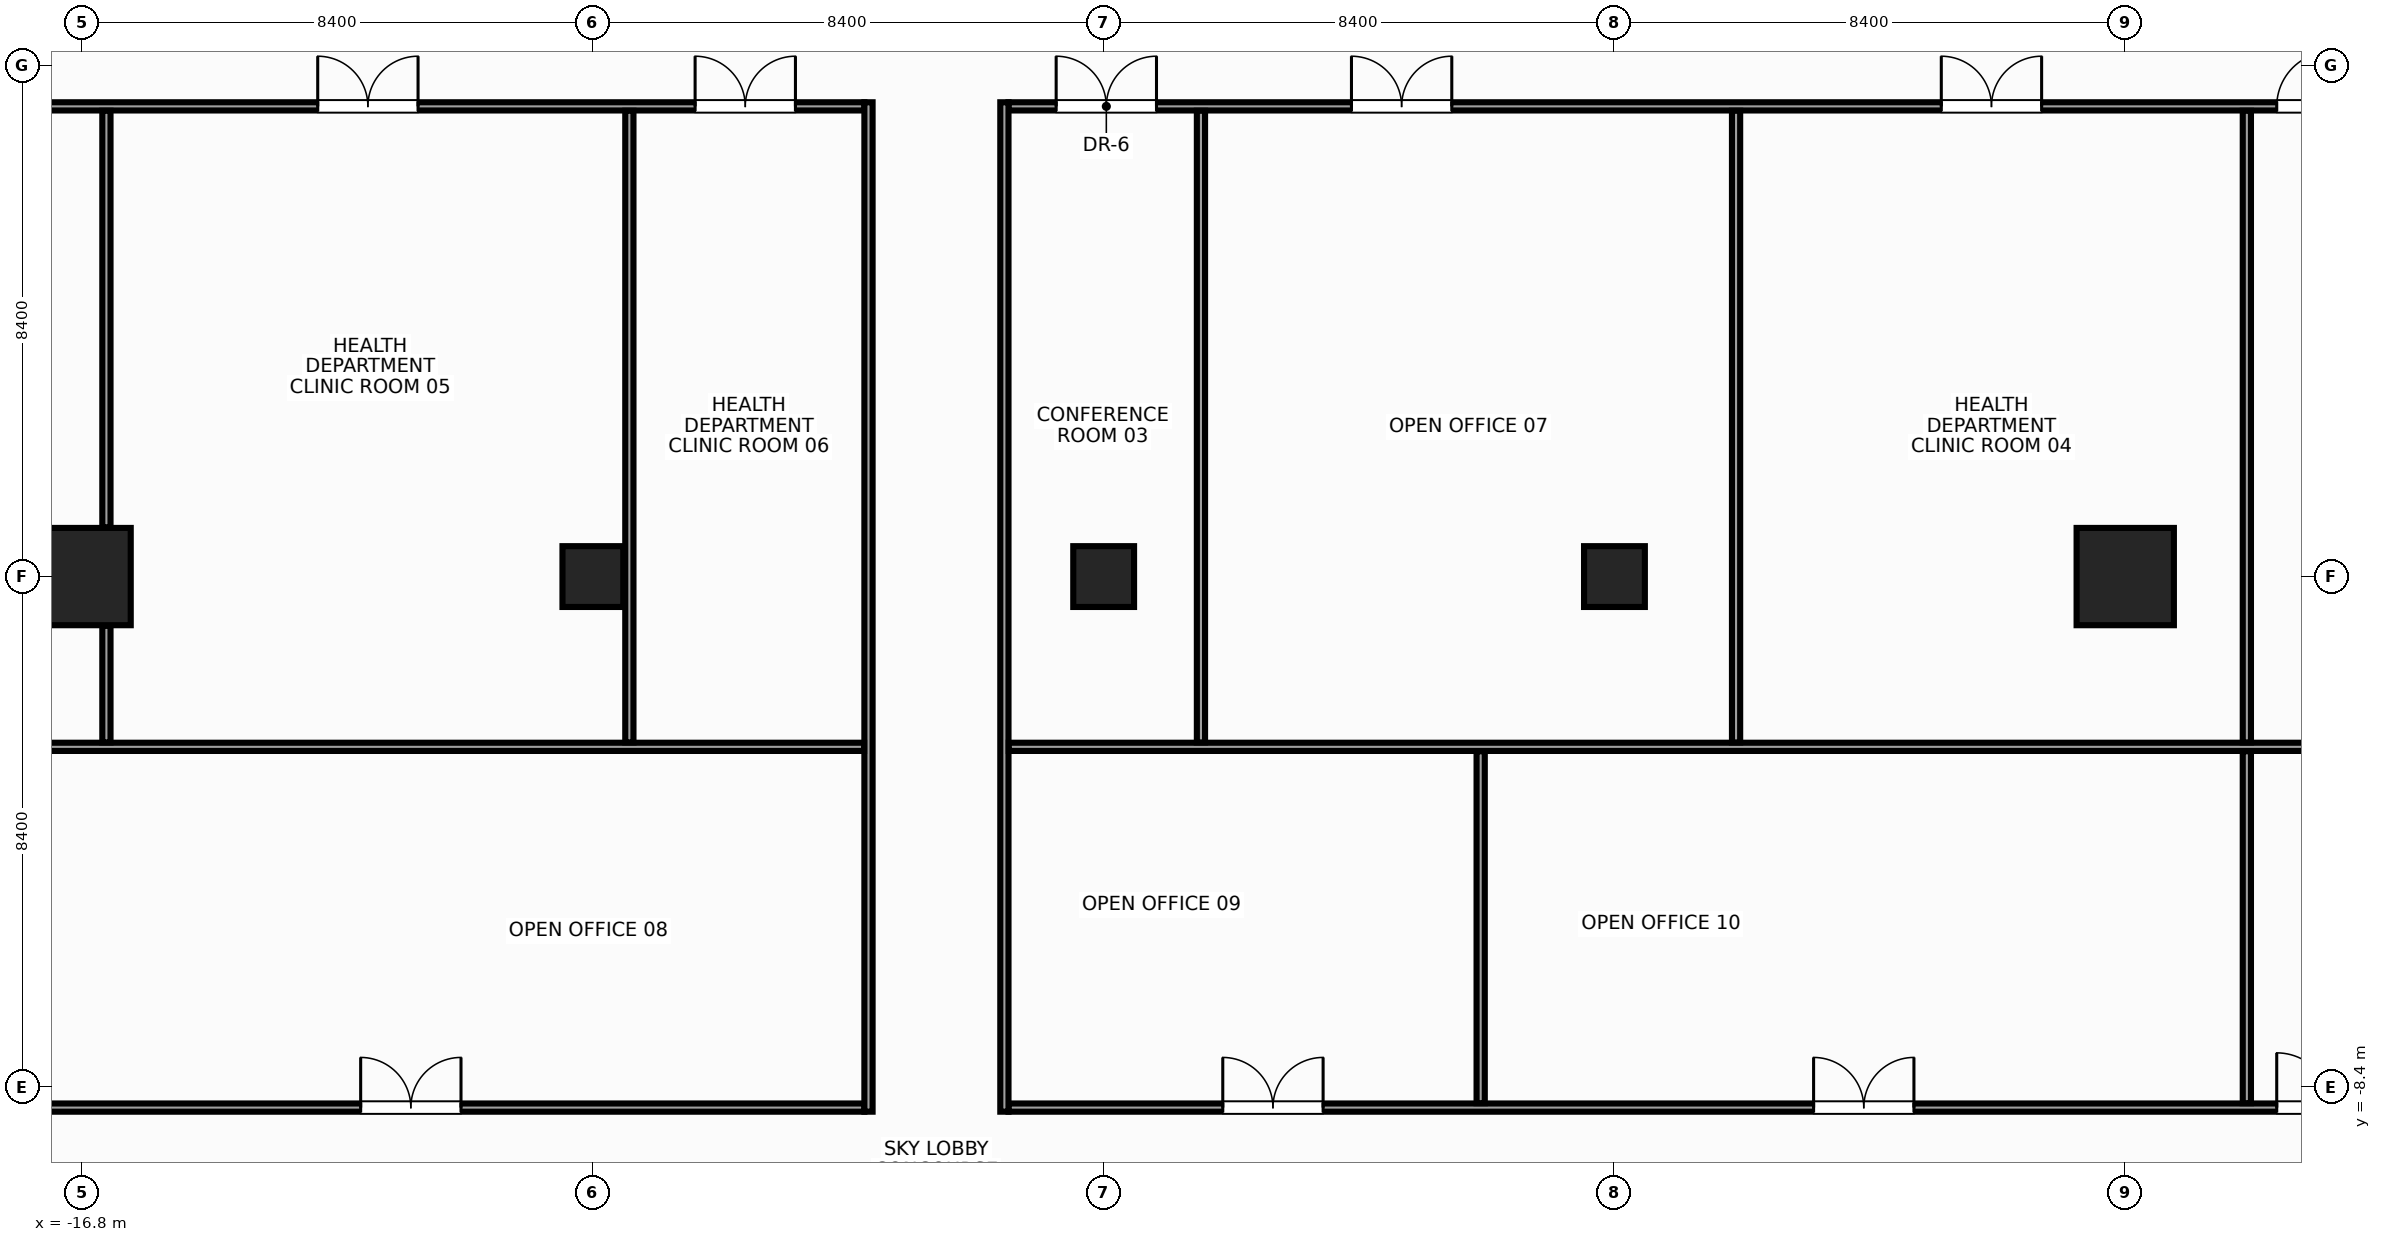
"""IFC4 building model, lengths in metres.
Left out: names, types, materials, properties, quantities, classifications, styles, units other than length and angle.
Written with IfcOpenShell. Run it as: python <this file> out.ifc"""

import sys

from ifc_helpers import new_model, si_unit, direction, frame, frame_2d, origin, origin_with_axes, origin_2d, place, context, subcontext, project, spatial, rectangle, hollow_rectangle, extrude, source, transform, mapped, element, fill, save


model = new_model("IFC4")
c1 = context("Model", 3, precision=1e-05, world=origin(), true_north=direction((0.0, 1.0)))
c2 = subcontext(c1, "Body", "Model", "MODEL_VIEW")
j1 = project(units=[si_unit("LENGTHUNIT", "METRE"), si_unit("PLANEANGLEUNIT", "RADIAN")], contexts=[c1])
p1 = place(None, origin())
s1 = spatial("IfcSite", under=j1, at=p1, CompositionType="ELEMENT")
p2 = place(p1, origin())
s2 = spatial("IfcBuilding", under=s1, at=p2, CompositionType="ELEMENT")
p3 = place(p2, frame((0.0, 0.0, 77.6)))
s3 = spatial("IfcBuildingStorey", under=s2, at=p3, CompositionType="ELEMENT", Elevation=77.6)
m1 = source(origin(), c2, "Body", "SweptSolid", [
    extrude(rectangle(XDim=1.6, YDim=1.6, at=origin_2d()), origin(), (0.0, 0.0, 1.0), 3.6),
])
for number, where, z_axis, x_axis in (
    (1, (-16.8, 0.0, 0.0), (0.0, 0.0, 1.0), (1.0, 0.0, 0.0)),
    (2, (16.8, 0.0, 0.0), (0.0, 0.0, 1.0), (1.0, 0.0, 0.0)),
):
    element("IfcColumn", number, at=place(p3, frame(where, z_axis=z_axis, x_axis=x_axis)), inside=s3, PredefinedType="COLUMN", context=c2, shape_type="MappedRepresentation", body=[
        mapped(m1, transform((0.0, 0.0, 0.0), x_axis=(1.0, 0.0, 0.0), y_axis=(0.0, 1.0, 0.0), z_axis=(0.0, 0.0, 1.0), scale=1.0)),
    ])
m2 = source(origin(), c2, "Body", "SweptSolid", [
    extrude(hollow_rectangle(XDim=1.0, YDim=1.0, WallThickness=0.045, at=origin_2d()), origin(), (0.0, 0.0, 1.0), 3.6),
])
for number, where, z_axis, x_axis in (
    (3, (-8.4, 0.0, 0.0), (0.0, 0.0, 1.0), (1.0, 0.0, 0.0)),
    (4, (8.4, 0.0, 0.0), (0.0, 0.0, 1.0), (1.0, 0.0, 0.0)),
):
    element("IfcColumn", number, at=place(p3, frame(where, z_axis=z_axis, x_axis=x_axis)), inside=s3, PredefinedType="COLUMN", context=c2, shape_type="MappedRepresentation", body=[
        mapped(m2, transform((0.0, 0.0, 0.0), x_axis=(1.0, 0.0, 0.0), y_axis=(0.0, 1.0, 0.0), z_axis=(0.0, 0.0, 1.0), scale=1.0)),
    ])
m3 = source(origin(), c2, "Body", "SweptSolid", [
    extrude(rectangle(XDim=1.0, YDim=1.0, at=origin_2d()), origin(), (0.0, 0.0, 1.0), 3.6),
])
p4 = place(p3, origin_with_axes())
e5 = element("IfcColumn", 5, at=p4, inside=s3, PredefinedType="COLUMN", context=c2, shape_type="MappedRepresentation", body=[
    mapped(m3, transform((0.0, 0.0, 0.0), x_axis=(1.0, 0.0, 0.0), y_axis=(0.0, 1.0, 0.0), z_axis=(0.0, 0.0, 1.0), scale=1.0)),
])
m4 = source(origin(), c2, "Body", "SweptSolid", [
    extrude(rectangle(XDim=16.8, YDim=0.135, at=frame_2d((8.4, 0.0))), origin(), (0.0, 0.0, 1.0), 2.745),
])
p5 = place(p3, frame((-20.735, 7.732, 0.0), z_axis=(0.0, 0.0, 1.0), x_axis=(1.0, 0.0, 0.0)))
e6 = element("IfcWall", 6, at=p5, inside=s3, PredefinedType="PARTITIONING", context=c2, shape_type="MappedRepresentation", body=[
    mapped(m4, transform((0.0, 0.0, 0.0), x_axis=(1.0, 0.0, 0.0), y_axis=(0.0, 1.0, 0.0), z_axis=(0.0, 0.0, 1.0), scale=1.0)),
])
p6 = place(p5, frame((2.404, 0.0, 0.0)))
e7 = element("IfcOpeningElement", 7, at=p6, cuts=e6, PredefinedType="OPENING", context=c2, shape_type="SweptSolid", body=[
    extrude(rectangle(XDim=0.9, YDim=2.15, at=frame_2d((0.45, 1.075))), frame((0.0, 0.08, 0.0), z_axis=(0.0, -1.0, 0.0), x_axis=(1.0, 0.0, 0.0)), (0.0, 0.0, 1.0), 0.159),
])
p7 = place(p5, frame((7.81, 0.0, 0.0)))
e8 = element("IfcOpeningElement", 8, at=p7, cuts=e6, PredefinedType="OPENING", context=c2, shape_type="SweptSolid", body=[
    extrude(rectangle(XDim=1.65, YDim=2.35, at=frame_2d((0.825, 1.175))), frame((0.0, 0.08, 0.0), z_axis=(0.0, -1.0, 0.0), x_axis=(1.0, 0.0, 0.0)), (0.0, 0.0, 1.0), 0.159),
])
p8 = place(p5, frame((14.016, 0.0, 0.0)))
e9 = element("IfcOpeningElement", 9, at=p8, cuts=e6, PredefinedType="OPENING", context=c2, shape_type="SweptSolid", body=[
    extrude(rectangle(XDim=1.65, YDim=2.35, at=frame_2d((0.825, 1.175))), frame((0.0, 0.08, 0.0), z_axis=(0.0, -1.0, 0.0), x_axis=(1.0, 0.0, 0.0)), (0.0, 0.0, 1.0), 0.159),
])
m5 = source(origin(), c2, "Body", "SweptSolid", [
    extrude(rectangle(XDim=22.3, YDim=0.135, at=frame_2d((11.15, 0.0))), origin(), (0.0, 0.0, 1.0), 2.745),
])
p9 = place(p3, frame((-1.565, 7.732, 0.0), z_axis=(0.0, 0.0, 1.0), x_axis=(1.0, 0.0, 0.0)))
e10 = element("IfcWall", 10, at=p9, inside=s3, PredefinedType="PARTITIONING", context=c2, shape_type="MappedRepresentation", body=[
    mapped(m5, transform((0.0, 0.0, 0.0), x_axis=(1.0, 0.0, 0.0), y_axis=(0.0, 1.0, 0.0), z_axis=(0.0, 0.0, 1.0), scale=1.0)),
])
p10 = place(p9, frame((20.856, 0.0, 0.0)))
e11 = element("IfcOpeningElement", 11, at=p10, cuts=e10, PredefinedType="OPENING", context=c2, shape_type="SweptSolid", body=[
    extrude(rectangle(XDim=0.9, YDim=2.15, at=frame_2d((0.45, 1.075))), frame((0.0, 0.08, 0.0), z_axis=(0.0, -1.0, 0.0), x_axis=(1.0, 0.0, 0.0)), (0.0, 0.0, 1.0), 0.159),
])
p11 = place(p9, frame((0.784, 0.0, 0.0)))
e12 = element("IfcOpeningElement", 12, at=p11, cuts=e10, PredefinedType="OPENING", context=c2, shape_type="SweptSolid", body=[
    extrude(rectangle(XDim=1.65, YDim=2.35, at=frame_2d((0.825, 1.175))), frame((0.0, 0.08, 0.0), z_axis=(0.0, -1.0, 0.0), x_axis=(1.0, 0.0, 0.0)), (0.0, 0.0, 1.0), 0.159),
])
p12 = place(p9, frame((15.34, 0.0, 0.0)))
e13 = element("IfcOpeningElement", 13, at=p12, cuts=e10, PredefinedType="OPENING", context=c2, shape_type="SweptSolid", body=[
    extrude(rectangle(XDim=1.65, YDim=2.35, at=frame_2d((0.825, 1.175))), frame((0.0, 0.08, 0.0), z_axis=(0.0, -1.0, 0.0), x_axis=(1.0, 0.0, 0.0)), (0.0, 0.0, 1.0), 0.159),
])
p13 = place(p9, frame((5.64, 0.0, 0.0)))
e14 = element("IfcOpeningElement", 14, at=p13, cuts=e10, PredefinedType="OPENING", context=c2, shape_type="SweptSolid", body=[
    extrude(rectangle(XDim=1.65, YDim=2.35, at=frame_2d((0.825, 1.175))), frame((0.0, 0.08, 0.0), z_axis=(0.0, -1.0, 0.0), x_axis=(1.0, 0.0, 0.0)), (0.0, 0.0, 1.0), 0.159),
])
p14 = place(p3, frame((-20.735, -8.732, 0.0), z_axis=(0.0, 0.0, 1.0), x_axis=(1.0, 0.0, 0.0)))
e15 = element("IfcWall", 15, at=p14, inside=s3, PredefinedType="PARTITIONING", context=c2, shape_type="MappedRepresentation", body=[
    mapped(m4, transform((0.0, 0.0, 0.0), x_axis=(1.0, 0.0, 0.0), y_axis=(0.0, 1.0, 0.0), z_axis=(0.0, 0.0, 1.0), scale=1.0)),
])
p15 = place(p14, frame((8.516, 0.0, 0.0)))
e16 = element("IfcOpeningElement", 16, at=p15, cuts=e15, PredefinedType="OPENING", context=c2, shape_type="SweptSolid", body=[
    extrude(rectangle(XDim=1.65, YDim=2.35, at=frame_2d((0.825, 1.175))), frame((0.0, 0.08, 0.0), z_axis=(0.0, -1.0, 0.0), x_axis=(1.0, 0.0, 0.0)), (0.0, 0.0, 1.0), 0.159),
])
p16 = place(p14, frame((0.544, 0.0, 0.0)))
e17 = element("IfcOpeningElement", 17, at=p16, cuts=e15, PredefinedType="OPENING", context=c2, shape_type="SweptSolid", body=[
    extrude(rectangle(XDim=0.9, YDim=2.15, at=frame_2d((0.45, 1.075))), frame((0.0, 0.08, 0.0), z_axis=(0.0, -1.0, 0.0), x_axis=(1.0, 0.0, 0.0)), (0.0, 0.0, 1.0), 0.159),
])
p17 = place(p3, frame((-1.565, -8.732, 0.0), z_axis=(0.0, 0.0, 1.0), x_axis=(1.0, 0.0, 0.0)))
e18 = element("IfcWall", 18, at=p17, inside=s3, PredefinedType="PARTITIONING", context=c2, shape_type="MappedRepresentation", body=[
    mapped(m5, transform((0.0, 0.0, 0.0), x_axis=(1.0, 0.0, 0.0), y_axis=(0.0, 1.0, 0.0), z_axis=(0.0, 0.0, 1.0), scale=1.0)),
])
p18 = place(p17, frame((3.524, 0.0, 0.0)))
e19 = element("IfcOpeningElement", 19, at=p18, cuts=e18, PredefinedType="OPENING", context=c2, shape_type="SweptSolid", body=[
    extrude(rectangle(XDim=1.65, YDim=2.35, at=frame_2d((0.825, 1.175))), frame((0.0, 0.08, 0.0), z_axis=(0.0, -1.0, 0.0), x_axis=(1.0, 0.0, 0.0)), (0.0, 0.0, 1.0), 0.159),
])
p19 = place(p17, frame((13.24, 0.0, 0.0)))
e20 = element("IfcOpeningElement", 20, at=p19, cuts=e18, PredefinedType="OPENING", context=c2, shape_type="SweptSolid", body=[
    extrude(rectangle(XDim=1.65, YDim=2.35, at=frame_2d((0.825, 1.175))), frame((0.0, 0.08, 0.0), z_axis=(0.0, -1.0, 0.0), x_axis=(1.0, 0.0, 0.0)), (0.0, 0.0, 1.0), 0.159),
])
p20 = place(p17, frame((20.856, 0.0, 0.0)))
e21 = element("IfcOpeningElement", 21, at=p20, cuts=e18, PredefinedType="OPENING", context=c2, shape_type="SweptSolid", body=[
    extrude(rectangle(XDim=0.9, YDim=2.15, at=frame_2d((0.45, 1.075))), frame((0.0, 0.08, 0.0), z_axis=(0.0, -1.0, 0.0), x_axis=(1.0, 0.0, 0.0)), (0.0, 0.0, 1.0), 0.159),
])
m6 = source(origin(), c2, "Body", "SweptSolid", [
    extrude(rectangle(XDim=16.6, YDim=0.135, at=frame_2d((8.3, 0.0))), origin(), (0.0, 0.0, 1.0), 2.645),
])
for number, where, z_axis, x_axis in (
    (22, (-3.867, -8.8, 0.0), (0.0, 0.0, 1.0), (0.0, 1.0, 0.0)),
    (23, (-1.633, -8.8, 0.0), (0.0, 0.0, 1.0), (0.0, 1.0, 0.0)),
):
    element("IfcWall", number, at=place(p3, frame(where, z_axis=z_axis, x_axis=x_axis)), inside=s3, PredefinedType="PARTITIONING", context=c2, shape_type="MappedRepresentation", body=[
        mapped(m6, transform((0.0, 0.0, 0.0), x_axis=(1.0, 0.0, 0.0), y_axis=(0.0, 1.0, 0.0), z_axis=(0.0, 0.0, 1.0), scale=1.0)),
    ])
m7 = source(origin(), c2, "Body", "SweptSolid", [
    extrude(rectangle(XDim=21.41, YDim=0.135, at=frame_2d((10.705, 0.0))), origin(), (0.0, 0.0, 1.0), 2.745),
])
p21 = place(p3, frame((-25.35, -2.8, 0.0), z_axis=(0.0, 0.0, 1.0), x_axis=(1.0, 0.0, 0.0)))
e24 = element("IfcWall", 24, at=p21, inside=s3, PredefinedType="PARTITIONING", context=c2, shape_type="MappedRepresentation", body=[
    mapped(m7, transform((0.0, 0.0, 0.0), x_axis=(1.0, 0.0, 0.0), y_axis=(0.0, 1.0, 0.0), z_axis=(0.0, 0.0, 1.0), scale=1.0)),
])
m8 = source(origin(), c2, "Body", "SweptSolid", [
    extrude(rectangle(XDim=26.91, YDim=0.135, at=frame_2d((13.455, 0.0))), origin(), (0.0, 0.0, 1.0), 2.745),
])
p22 = place(p3, frame((-1.56, -2.8, 0.0), z_axis=(0.0, 0.0, 1.0), x_axis=(1.0, 0.0, 0.0)))
e25 = element("IfcWall", 25, at=p22, inside=s3, PredefinedType="PARTITIONING", context=c2, shape_type="MappedRepresentation", body=[
    mapped(m8, transform((0.0, 0.0, 0.0), x_axis=(1.0, 0.0, 0.0), y_axis=(0.0, 1.0, 0.0), z_axis=(0.0, 0.0, 1.0), scale=1.0)),
])
m9 = source(origin(), c2, "Body", "SweptSolid", [
    extrude(rectangle(XDim=1.917, YDim=0.135, at=frame_2d((0.959, 0.0))), origin(), (0.0, 0.0, 1.0), 3.36),
])
p23 = place(p3, frame((-16.4, -2.728, 0.0), z_axis=(0.0, 0.0, 1.0), x_axis=(0.0, 1.0, 0.0)))
e26 = element("IfcWall", 26, at=p23, inside=s3, PredefinedType="PARTITIONING", context=c2, shape_type="MappedRepresentation", body=[
    mapped(m9, transform((0.0, 0.0, 0.0), x_axis=(1.0, 0.0, 0.0), y_axis=(0.0, 1.0, 0.0), z_axis=(0.0, 0.0, 1.0), scale=1.0)),
])
m10 = source(origin(), c2, "Body", "SweptSolid", [
    extrude(rectangle(XDim=6.85, YDim=0.135, at=frame_2d((3.425, 0.0))), origin(), (0.0, 0.0, 1.0), 2.645),
])
p24 = place(p3, frame((-16.4, 0.81, 0.0), z_axis=(0.0, 0.0, 1.0), x_axis=(0.0, 1.0, 0.0)))
e27 = element("IfcWall", 27, at=p24, inside=s3, PredefinedType="PARTITIONING", context=c2, shape_type="MappedRepresentation", body=[
    mapped(m10, transform((0.0, 0.0, 0.0), x_axis=(1.0, 0.0, 0.0), y_axis=(0.0, 1.0, 0.0), z_axis=(0.0, 0.0, 1.0), scale=1.0)),
])
m11 = source(origin(), c2, "Body", "SweptSolid", [
    extrude(rectangle(XDim=10.387, YDim=0.135, at=frame_2d((5.194, 0.0))), origin(), (0.0, 0.0, 1.0), 2.645),
])
for number, where, z_axis, x_axis in (
    (28, (-7.8, -2.728, 0.0), (0.0, 0.0, 1.0), (0.0, 1.0, 0.0)),
    (29, (1.6, -2.728, 0.0), (0.0, 0.0, 1.0), (0.0, 1.0, 0.0)),
    (30, (10.4, -2.728, 0.0), (0.0, 0.0, 1.0), (0.0, 1.0, 0.0)),
):
    element("IfcWall", number, at=place(p3, frame(where, z_axis=z_axis, x_axis=x_axis)), inside=s3, PredefinedType="PARTITIONING", context=c2, shape_type="MappedRepresentation", body=[
        mapped(m11, transform((0.0, 0.0, 0.0), x_axis=(1.0, 0.0, 0.0), y_axis=(0.0, 1.0, 0.0), z_axis=(0.0, 0.0, 1.0), scale=1.0)),
    ])
m12 = source(origin(), c2, "Body", "SweptSolid", [
    extrude(rectangle(XDim=10.387, YDim=0.135, at=frame_2d((5.194, 0.0))), origin(), (0.0, 0.0, 1.0), 2.745),
])
p25 = place(p3, frame((18.8, -2.728, 0.0), z_axis=(0.0, 0.0, 1.0), x_axis=(0.0, 1.0, 0.0)))
e31 = element("IfcWall", 31, at=p25, inside=s3, PredefinedType="PARTITIONING", context=c2, shape_type="MappedRepresentation", body=[
    mapped(m12, transform((0.0, 0.0, 0.0), x_axis=(1.0, 0.0, 0.0), y_axis=(0.0, 1.0, 0.0), z_axis=(0.0, 0.0, 1.0), scale=1.0)),
])
m13 = source(origin(), c2, "Body", "SweptSolid", [
    extrude(rectangle(XDim=5.787, YDim=0.135, at=frame_2d((2.894, 0.0))), origin(), (0.0, 0.0, 1.0), 3.36),
])
for number, where, z_axis, x_axis in (
    (32, (6.2, -8.66, 0.0), (0.0, 0.0, 1.0), (0.0, 1.0, 0.0)),
    (33, (18.8, -8.66, 0.0), (0.0, 0.0, 1.0), (0.0, 1.0, 0.0)),
):
    element("IfcWall", number, at=place(p3, frame(where, z_axis=z_axis, x_axis=x_axis)), inside=s3, PredefinedType="PARTITIONING", context=c2, shape_type="MappedRepresentation", body=[
        mapped(m13, transform((0.0, 0.0, 0.0), x_axis=(1.0, 0.0, 0.0), y_axis=(0.0, 1.0, 0.0), z_axis=(0.0, 0.0, 1.0), scale=1.0)),
    ])
m14 = source(origin(), c2, "Body", "SweptSolid", [
    extrude(rectangle(XDim=0.9, YDim=2.15, at=frame_2d((0.45, 1.075))), frame((0.0, 0.025, 0.0), z_axis=(0.0, -1.0, 0.0), x_axis=(1.0, 0.0, 0.0)), (0.0, 0.0, 1.0), 0.05),
])
p26 = place(p10, origin())
e34 = element("IfcDoor", 34, at=p26, inside=s3, OperationType="SINGLE_SWING_RIGHT", PredefinedType="DOOR", context=c2, shape_type="MappedRepresentation", body=[
    mapped(m14, transform((0.0, 0.0, 0.0), x_axis=(1.0, 0.0, 0.0), y_axis=(0.0, 1.0, 0.0), z_axis=(0.0, 0.0, 1.0), scale=1.0)),
])
fill(e11, e34)
m15 = source(origin(), c2, "Body", "SweptSolid", [
    extrude(rectangle(XDim=1.65, YDim=2.35, at=frame_2d((0.825, 1.175))), frame((0.0, 0.025, 0.0), z_axis=(0.0, -1.0, 0.0), x_axis=(1.0, 0.0, 0.0)), (0.0, 0.0, 1.0), 0.05),
])
p27 = place(p11, origin())
e35 = element("IfcDoor", 35, at=p27, inside=s3, OperationType="DOUBLE_DOOR_SINGLE_SWING", PredefinedType="DOOR", context=c2, shape_type="MappedRepresentation", body=[
    mapped(m15, transform((0.0, 0.0, 0.0), x_axis=(1.0, 0.0, 0.0), y_axis=(0.0, 1.0, 0.0), z_axis=(0.0, 0.0, 1.0), scale=1.0)),
])
fill(e12, e35)
p28 = place(p12, origin())
e36 = element("IfcDoor", 36, at=p28, inside=s3, OperationType="DOUBLE_DOOR_SINGLE_SWING", PredefinedType="DOOR", context=c2, shape_type="MappedRepresentation", body=[
    mapped(m15, transform((0.0, 0.0, 0.0), x_axis=(1.0, 0.0, 0.0), y_axis=(0.0, 1.0, 0.0), z_axis=(0.0, 0.0, 1.0), scale=1.0)),
])
fill(e13, e36)
p29 = place(p7, origin())
e37 = element("IfcDoor", 37, at=p29, inside=s3, OperationType="DOUBLE_DOOR_SINGLE_SWING", PredefinedType="DOOR", context=c2, shape_type="MappedRepresentation", body=[
    mapped(m15, transform((0.0, 0.0, 0.0), x_axis=(1.0, 0.0, 0.0), y_axis=(0.0, 1.0, 0.0), z_axis=(0.0, 0.0, 1.0), scale=1.0)),
])
fill(e8, e37)
p30 = place(p8, origin())
e38 = element("IfcDoor", 38, at=p30, inside=s3, OperationType="DOUBLE_DOOR_SINGLE_SWING", PredefinedType="DOOR", context=c2, shape_type="MappedRepresentation", body=[
    mapped(m15, transform((0.0, 0.0, 0.0), x_axis=(1.0, 0.0, 0.0), y_axis=(0.0, 1.0, 0.0), z_axis=(0.0, 0.0, 1.0), scale=1.0)),
])
fill(e9, e38)
p31 = place(p13, origin())
e39 = element("IfcDoor", 39, at=p31, inside=s3, OperationType="DOUBLE_DOOR_SINGLE_SWING", PredefinedType="DOOR", context=c2, shape_type="MappedRepresentation", body=[
    mapped(m15, transform((0.0, 0.0, 0.0), x_axis=(1.0, 0.0, 0.0), y_axis=(0.0, 1.0, 0.0), z_axis=(0.0, 0.0, 1.0), scale=1.0)),
])
fill(e14, e39)
p32 = place(p15, origin())
e40 = element("IfcDoor", 40, at=p32, inside=s3, OperationType="DOUBLE_DOOR_SINGLE_SWING", PredefinedType="DOOR", context=c2, shape_type="MappedRepresentation", body=[
    mapped(m15, transform((0.0, 0.0, 0.0), x_axis=(1.0, 0.0, 0.0), y_axis=(0.0, 1.0, 0.0), z_axis=(0.0, 0.0, 1.0), scale=1.0)),
])
fill(e16, e40)
p33 = place(p18, origin())
e41 = element("IfcDoor", 41, at=p33, inside=s3, OperationType="DOUBLE_DOOR_SINGLE_SWING", PredefinedType="DOOR", context=c2, shape_type="MappedRepresentation", body=[
    mapped(m15, transform((0.0, 0.0, 0.0), x_axis=(1.0, 0.0, 0.0), y_axis=(0.0, 1.0, 0.0), z_axis=(0.0, 0.0, 1.0), scale=1.0)),
])
fill(e19, e41)
p34 = place(p19, origin())
e42 = element("IfcDoor", 42, at=p34, inside=s3, OperationType="DOUBLE_DOOR_SINGLE_SWING", PredefinedType="DOOR", context=c2, shape_type="MappedRepresentation", body=[
    mapped(m15, transform((0.0, 0.0, 0.0), x_axis=(1.0, 0.0, 0.0), y_axis=(0.0, 1.0, 0.0), z_axis=(0.0, 0.0, 1.0), scale=1.0)),
])
fill(e20, e42)
p35 = place(p20, origin())
e43 = element("IfcDoor", 43, at=p35, inside=s3, OperationType="SINGLE_SWING_LEFT", PredefinedType="DOOR", context=c2, shape_type="MappedRepresentation", body=[
    mapped(m14, transform((0.0, 0.0, 0.0), x_axis=(1.0, 0.0, 0.0), y_axis=(0.0, 1.0, 0.0), z_axis=(0.0, 0.0, 1.0), scale=1.0)),
])
fill(e21, e43)
save(model, sys.argv[1])
